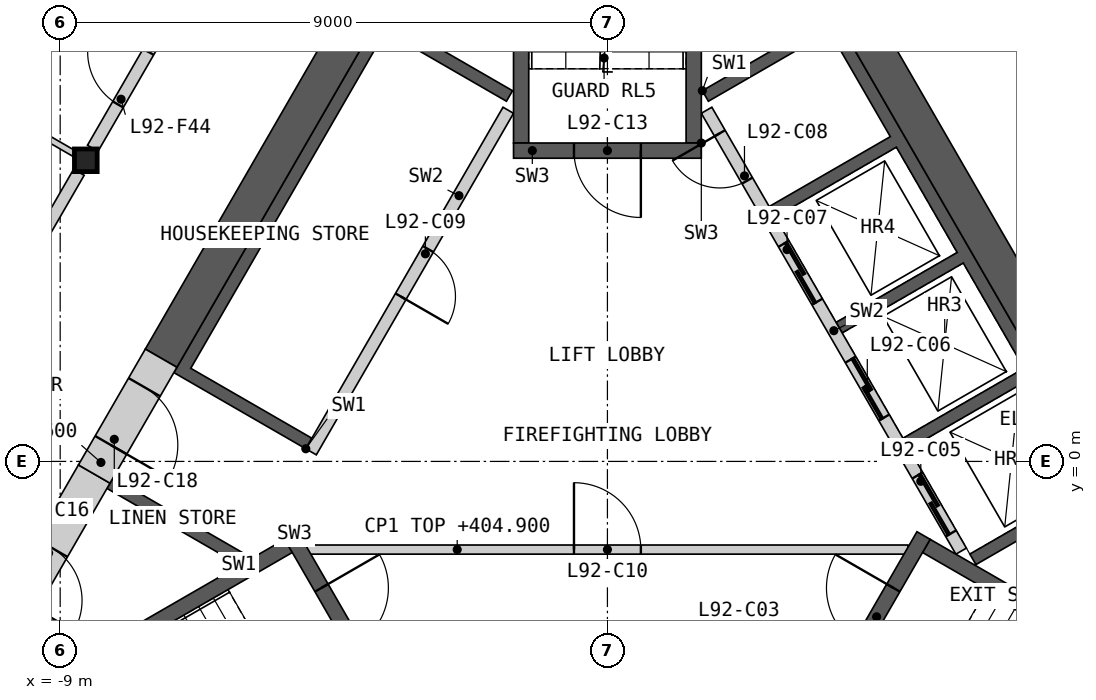
"""IFC4 building model, lengths in metres.
Left out: names, types, materials, properties, quantities, classifications, styles, units other than length and angle.
Written with IfcOpenShell. Run it as: python <this file> out.ifc"""

import sys

from ifc_helpers import new_model, si_unit, direction, frame, frame_2d, origin, origin_2d, place, context, subcontext, project, spatial, polyline, rectangle, i_section, outline, extrude, element, fill, save


model = new_model("IFC4")
c1 = context("Model", 3, precision=1e-05, world=origin(), true_north=direction((0.0, 1.0)))
c2 = subcontext(c1, "Body", "Model", "MODEL_VIEW")
j1 = project(units=[si_unit("LENGTHUNIT", "METRE"), si_unit("PLANEANGLEUNIT", "RADIAN")], contexts=[c1])
p1 = place(None, origin())
s1 = spatial("IfcSite", under=j1, at=p1, CompositionType="ELEMENT")
p2 = place(p1, origin())
s2 = spatial("IfcBuilding", under=s1, at=p2, CompositionType="ELEMENT")
p3 = place(p2, frame((0.0, 0.0, 401.8)))
s3 = spatial("IfcBuildingStorey", under=s2, at=p3, CompositionType="ELEMENT", Elevation=401.8)
p4 = place(p3, frame((-8.578, 4.953, 0.0), z_axis=(0.0, 0.0, 1.0), x_axis=(1.0, 0.0, 0.0)))
e1 = element("IfcColumn", 1, at=p4, inside=s3, PredefinedType="COLUMN", context=c2, shape_type="SweptSolid", body=[
    extrude(i_section(OverallWidth=0.374, OverallDepth=0.372, WebThickness=0.016, FlangeThickness=0.026, at=origin_2d()), origin(), (0.0, 0.0, 1.0), 3.4),
])
p5 = place(p3, origin())
e2 = element("IfcWall", 2, at=p5, inside=s3, PredefinedType="SHEAR", context=c2, shape_type="SweptSolid", body=[
    extrude(outline(polyline([(1.561, 6.097), (3.731, 7.35), (8.231, -0.444), (6.061, -1.697), (5.96, -1.524), (7.952, -0.374), (6.952, 1.358), (4.96, 0.208), (4.861, 0.381), (6.852, 1.531), (5.852, 3.263), (3.861, 2.113), (3.76, 2.287), (5.752, 3.437), (4.752, 5.169), (2.76, 4.019), (2.66, 4.192), (4.652, 5.342), (3.652, 7.074), (1.66, 5.924), (1.561, 6.097)])), origin(), (0.0, 0.0, 1.0), 3.1),
])
p6 = place(p3, frame((5.817, -1.476, 0.0), z_axis=(0.0, 0.0, 1.0), x_axis=(-0.500002616675, 0.866023893041, 0.0)))
e3 = element("IfcWall", 3, at=p6, inside=s3, PredefinedType="SOLIDWALL", context=c2, shape_type="SweptSolid", body=[
    extrude(rectangle(XDim=8.373, YDim=0.2, at=frame_2d((4.187, 0.0))), origin(), (0.0, 0.0, 1.0), 3.1),
])
p7 = place(p6, frame((0.337, 0.0, 0.0)))
e4 = element("IfcOpeningElement", 4, at=p7, cuts=e3, PredefinedType="OPENING", context=c2, shape_type="SweptSolid", body=[
    extrude(rectangle(XDim=1.1, YDim=2.1, at=frame_2d((0.55, 1.05))), frame((0.0, 0.11, 0.0), z_axis=(0.0, -1.0, 0.0), x_axis=(1.0, 0.0, 0.0)), (0.0, 0.0, 1.0), 0.22),
])
p8 = place(p6, frame((2.537, 0.0, 0.0)))
e5 = element("IfcOpeningElement", 5, at=p8, cuts=e3, PredefinedType="OPENING", context=c2, shape_type="SweptSolid", body=[
    extrude(rectangle(XDim=1.1, YDim=2.1, at=frame_2d((0.55, 1.05))), frame((0.0, 0.11, 0.0), z_axis=(0.0, -1.0, 0.0), x_axis=(1.0, 0.0, 0.0)), (0.0, 0.0, 1.0), 0.22),
])
p9 = place(p6, frame((4.737, 0.0, 0.0)))
e6 = element("IfcOpeningElement", 6, at=p9, cuts=e3, PredefinedType="OPENING", context=c2, shape_type="SweptSolid", body=[
    extrude(rectangle(XDim=1.1, YDim=2.1, at=frame_2d((0.55, 1.05))), frame((0.0, 0.11, 0.0), z_axis=(0.0, -1.0, 0.0), x_axis=(1.0, 0.0, 0.0)), (0.0, 0.0, 1.0), 0.22),
])
p10 = place(p6, frame((7.037, 0.0, 0.0)))
e7 = element("IfcOpeningElement", 7, at=p10, cuts=e3, PredefinedType="OPENING", context=c2, shape_type="SweptSolid", body=[
    extrude(rectangle(XDim=0.9, YDim=2.1, at=frame_2d((0.45, 1.05))), frame((0.0, 0.11, 0.0), z_axis=(0.0, -1.0, 0.0), x_axis=(1.0, 0.0, 0.0)), (0.0, 0.0, 1.0), 0.22),
])
p11 = place(p3, origin())
e8 = element("IfcWall", 8, at=p11, inside=s3, PredefinedType="SHEAR", context=c2, shape_type="SweptSolid", body=[
    extrude(outline(polyline([(-6.061, -1.697), (-8.231, -0.444), (-8.131, -0.271), (-5.96, -1.524), (-6.061, -1.697)])), origin(), (0.0, 0.0, 1.0), 3.1),
])
p12 = place(p3, origin())
e9 = element("IfcWall", 9, at=p12, inside=s3, PredefinedType="SHEAR", context=c2, shape_type="SweptSolid", body=[
    extrude(outline(polyline([(-4.96, 0.208), (-7.131, 1.461), (-3.731, 7.35), (-1.561, 6.097), (-1.66, 5.924), (-3.652, 7.074), (-6.852, 1.531), (-4.861, 0.381), (-4.96, 0.208)])), origin(), (0.0, 0.0, 1.0), 3.1),
])
p13 = place(p3, frame((-1.631, 5.776, 0.0), z_axis=(0.0, 0.0, 1.0), x_axis=(-0.499992876559, -0.866029516466, 0.0)))
e10 = element("IfcWall", 10, at=p13, inside=s3, PredefinedType="SOLIDWALL", context=c2, shape_type="SweptSolid", body=[
    extrude(rectangle(XDim=6.486, YDim=0.2, at=frame_2d((3.243, 0.0))), origin(), (0.0, 0.0, 1.0), 3.1),
])
p14 = place(p13, frame((2.637, 0.0, 0.0)))
e11 = element("IfcOpeningElement", 11, at=p14, cuts=e10, PredefinedType="OPENING", context=c2, shape_type="SweptSolid", body=[
    extrude(rectangle(XDim=0.9, YDim=2.1, at=frame_2d((0.45, 1.05))), frame((0.0, 0.11, 0.0), z_axis=(0.0, -1.0, 0.0), x_axis=(1.0, 0.0, 0.0)), (0.0, 0.0, 1.0), 0.22),
])
p15 = place(p3, frame((-4.941, -1.45, 0.0), z_axis=(0.0, 0.0, 1.0), x_axis=(1.0, 0.0, 0.0)))
e12 = element("IfcWall", 12, at=p15, inside=s3, PredefinedType="PARTITIONING", context=c2, shape_type="SweptSolid", body=[
    extrude(rectangle(XDim=9.882, YDim=0.15, at=frame_2d((4.941, 0.0))), origin(), (0.0, 0.0, 1.0), 3.1),
])
p16 = place(p15, frame((4.391, 0.0, 0.0)))
e13 = element("IfcOpeningElement", 13, at=p16, cuts=e12, PredefinedType="OPENING", context=c2, shape_type="SweptSolid", body=[
    extrude(rectangle(XDim=1.1, YDim=2.1, at=frame_2d((0.55, 1.05))), frame((0.0, 0.085, 0.0), z_axis=(0.0, -1.0, 0.0), x_axis=(1.0, 0.0, 0.0)), (0.0, 0.0, 1.0), 0.17),
])
p17 = place(p3, origin())
e14 = element("IfcWall", 14, at=p17, inside=s3, PredefinedType="SHEAR", context=c2, shape_type="SweptSolid", body=[
    extrude(outline(polyline([(-5.307, -1.281), (-10.374, -4.206), (-10.032, -4.298), (-5.182, -1.498), (-5.307, -1.281)])), origin(), (0.0, 0.0, 1.0), 3.1),
])
p18 = place(p3, frame((-5.199, -1.219, 0.0), z_axis=(0.0, 0.0, 1.0), x_axis=(0.499982516597, -0.866035497597, 0.0)))
e15 = element("IfcWall", 15, at=p18, inside=s3, PredefinedType="SHEAR", context=c2, shape_type="SweptSolid", body=[
    extrude(rectangle(XDim=3.088, YDim=0.25, at=frame_2d((1.544, 0.0))), origin(), (0.0, 0.0, 1.0), 3.1),
])
p19 = place(p18, frame((0.994, 0.0, 0.0)))
e16 = element("IfcOpeningElement", 16, at=p19, cuts=e15, PredefinedType="OPENING", context=c2, shape_type="SweptSolid", body=[
    extrude(rectangle(XDim=1.1, YDim=2.1, at=frame_2d((0.55, 1.05))), frame((0.0, 0.135, 0.0), z_axis=(0.0, -1.0, 0.0), x_axis=(1.0, 0.0, 0.0)), (0.0, 0.0, 1.0), 0.27),
])
p20 = place(p3, origin())
e17 = element("IfcWall", 17, at=p20, inside=s3, PredefinedType="SHEAR", context=c2, shape_type="SweptSolid", body=[
    extrude(outline(polyline([(10.032, -4.298), (10.374, -4.206), (5.307, -1.281), (5.182, -1.498), (10.032, -4.298)])), origin(), (0.0, 0.0, 1.0), 3.1),
])
p21 = place(p3, frame((3.655, -3.893, 0.0), z_axis=(0.0, 0.0, 1.0), x_axis=(0.499982516597, 0.866035497597, 0.0)))
e18 = element("IfcWall", 18, at=p21, inside=s3, PredefinedType="SHEAR", context=c2, shape_type="SweptSolid", body=[
    extrude(rectangle(XDim=3.088, YDim=0.25, at=frame_2d((1.544, 0.0))), origin(), (0.0, 0.0, 1.0), 3.1),
])
p22 = place(p21, frame((0.994, 0.0, 0.0)))
e19 = element("IfcOpeningElement", 19, at=p22, cuts=e18, PredefinedType="OPENING", context=c2, shape_type="SweptSolid", body=[
    extrude(rectangle(XDim=1.1, YDim=2.1, at=frame_2d((0.55, 1.05))), frame((0.0, 0.135, 0.0), z_axis=(0.0, -1.0, 0.0), x_axis=(1.0, 0.0, 0.0)), (0.0, 0.0, 1.0), 0.27),
])
p23 = place(p3, origin())
e20 = element("IfcWall", 20, at=p23, inside=s3, PredefinedType="SHEAR", context=c2, shape_type="SweptSolid", body=[
    extrude(outline(polyline([(1.544, 5.237), (1.544, 11.087), (1.294, 10.837), (1.294, 5.237), (1.544, 5.237)])), origin(), (0.0, 0.0, 1.0), 3.1),
])
p24 = place(p3, origin())
e21 = element("IfcWall", 21, at=p24, inside=s3, PredefinedType="SHEAR", context=c2, shape_type="SweptSolid", body=[
    extrude(outline(polyline([(-1.294, 10.837), (-1.544, 11.087), (-1.544, 5.237), (-1.294, 5.237), (-1.294, 10.837)])), origin(), (0.0, 0.0, 1.0), 3.1),
])
p25 = place(p3, frame((1.544, 5.112, 0.0), z_axis=(0.0, 0.0, 1.0), x_axis=(-1.0, 0.0, 0.0)))
e22 = element("IfcWall", 22, at=p25, inside=s3, PredefinedType="SHEAR", context=c2, shape_type="SweptSolid", body=[
    extrude(rectangle(XDim=3.088, YDim=0.25, at=frame_2d((1.544, 0.0))), origin(), (0.0, 0.0, 1.0), 3.1),
])
p26 = place(p25, frame((0.994, 0.0, 0.0)))
e23 = element("IfcOpeningElement", 23, at=p26, cuts=e22, PredefinedType="OPENING", context=c2, shape_type="SweptSolid", body=[
    extrude(rectangle(XDim=1.1, YDim=2.1, at=frame_2d((0.55, 1.05))), frame((0.0, 0.135, 0.0), z_axis=(0.0, -1.0, 0.0), x_axis=(1.0, 0.0, 0.0)), (0.0, 0.0, 1.0), 0.27),
])
p27 = place(p3, frame((8.686, -0.634, 0.0), z_axis=(0.0, 0.0, 1.0), x_axis=(-0.500004601921, 0.866022746848, 0.0)))
e24 = element("IfcWall", 24, at=p27, inside=s3, PredefinedType="SHEAR", context=c2, shape_type="SweptSolid", body=[
    extrude(rectangle(XDim=16.853, YDim=0.6, at=frame_2d((8.426, 0.0))), origin(), (0.0, 0.0, 1.0), 3.1),
])
p28 = place(p3, frame((-3.794, 7.84, 0.0), z_axis=(0.0, 0.0, 1.0), x_axis=(-0.499974747889, -0.866039982607, 0.0)))
e25 = element("IfcWall", 25, at=p28, inside=s3, PredefinedType="SHEAR", context=c2, shape_type="SweptSolid", body=[
    extrude(rectangle(XDim=7.092, YDim=0.6, at=frame_2d((3.546, 0.0))), origin(), (0.0, 0.0, 1.0), 3.1),
])
p29 = place(p3, frame((-8.44, -0.208, 0.0), z_axis=(0.0, 0.0, 1.0), x_axis=(-0.499997052475, -0.866027105532, 0.0)))
e26 = element("IfcWall", 26, at=p29, inside=s3, PredefinedType="SHEAR", context=c2, shape_type="SweptSolid", body=[
    extrude(rectangle(XDim=3.001, YDim=0.6, at=frame_2d((1.501, 0.0))), origin(), (0.0, 0.0, 1.0), 3.1),
])
p30 = place(p29, frame((1.4, 0.0, 0.0)))
e27 = element("IfcOpeningElement", 27, at=p30, cuts=e26, PredefinedType="OPENING", context=c2, shape_type="SweptSolid", body=[
    extrude(rectangle(XDim=1.0, YDim=2.1, at=frame_2d((0.5, 1.05))), frame((0.0, 0.31, 0.0), z_axis=(0.0, -1.0, 0.0), x_axis=(1.0, 0.0, 0.0)), (0.0, 0.0, 1.0), 0.62),
])
p31 = place(p3, frame((-7.34, 1.698, 0.0), z_axis=(0.0, 0.0, 1.0), x_axis=(-0.50002983664, -0.866008176907, 0.0)))
e28 = element("IfcWall", 28, at=p31, inside=s3, PredefinedType="SHEAR", context=c2, shape_type="SweptSolid", body=[
    extrude(rectangle(XDim=2.2, YDim=0.6, at=frame_2d((1.1, 0.0))), origin(), (0.0, 0.0, 1.0), 3.1),
])
p32 = place(p31, frame((0.55, 0.0, 0.0)))
e29 = element("IfcOpeningElement", 29, at=p32, cuts=e28, PredefinedType="OPENING", context=c2, shape_type="SweptSolid", body=[
    extrude(rectangle(XDim=1.1, YDim=2.1, at=frame_2d((0.55, 1.05))), frame((0.0, 0.31, 0.0), z_axis=(0.0, -1.0, 0.0), x_axis=(1.0, 0.0, 0.0)), (0.0, 0.0, 1.0), 0.62),
])
p33 = place(p3, frame((4.403, 12.185, 0.0), z_axis=(0.0, 0.0, 1.0), x_axis=(0.499992155518, -0.866029932751, 0.0)))
e30 = element("IfcWall", 30, at=p33, inside=s3, PredefinedType="PARTITIONING", context=c2, shape_type="SweptSolid", body=[
    extrude(rectangle(XDim=8.123, YDim=0.2, at=frame_2d((4.062, 0.0))), origin(), (0.0, 0.0, 1.0), 3.1),
])
p34 = place(p33, frame((3.963, 0.0, 0.0)))
e31 = element("IfcOpeningElement", 31, at=p34, cuts=e30, PredefinedType="OPENING", context=c2, shape_type="SweptSolid", body=[
    extrude(rectangle(XDim=1.0, YDim=2.1, at=frame_2d((0.5, 1.05))), frame((0.0, 0.11, 0.0), z_axis=(0.0, -1.0, 0.0), x_axis=(1.0, 0.0, 0.0)), (0.0, 0.0, 1.0), 0.22),
])
p35 = place(p33, frame((1.153, 0.0, 0.0)))
e32 = element("IfcOpeningElement", 32, at=p35, cuts=e30, PredefinedType="OPENING", context=c2, shape_type="SweptSolid", body=[
    extrude(rectangle(XDim=1.0, YDim=2.1, at=frame_2d((0.5, 1.05))), frame((0.0, 0.11, 0.0), z_axis=(0.0, -1.0, 0.0), x_axis=(1.0, 0.0, 0.0)), (0.0, 0.0, 1.0), 0.22),
])
p36 = place(p3, frame((-8.465, 5.15, 0.0), z_axis=(0.0, 0.0, 1.0), x_axis=(0.499992155518, 0.866029932751, 0.0)))
e33 = element("IfcWall", 33, at=p36, inside=s3, PredefinedType="PARTITIONING", context=c2, shape_type="SweptSolid", body=[
    extrude(rectangle(XDim=8.123, YDim=0.2, at=frame_2d((4.062, 0.0))), origin(), (0.0, 0.0, 1.0), 3.1),
])
p37 = place(p36, frame((5.97, 0.0, 0.0)))
e34 = element("IfcOpeningElement", 34, at=p37, cuts=e33, PredefinedType="OPENING", context=c2, shape_type="SweptSolid", body=[
    extrude(rectangle(XDim=1.0, YDim=2.1, at=frame_2d((0.5, 1.05))), frame((0.0, 0.11, 0.0), z_axis=(0.0, -1.0, 0.0), x_axis=(1.0, 0.0, 0.0)), (0.0, 0.0, 1.0), 0.22),
])
p38 = place(p36, frame((0.832, 0.0, 0.0)))
e35 = element("IfcOpeningElement", 35, at=p38, cuts=e33, PredefinedType="OPENING", context=c2, shape_type="SweptSolid", body=[
    extrude(rectangle(XDim=1.0, YDim=2.1, at=frame_2d((0.5, 1.05))), frame((0.0, 0.11, 0.0), z_axis=(0.0, -1.0, 0.0), x_axis=(1.0, 0.0, 0.0)), (0.0, 0.0, 1.0), 0.22),
])
p39 = place(p3, frame((-12.754, -2.279, 0.0), z_axis=(0.0, 0.0, 1.0), x_axis=(0.500001682468, 0.866024432409, 0.0)))
e36 = element("IfcWall", 36, at=p39, inside=s3, PredefinedType="PARTITIONING", context=c2, shape_type="SweptSolid", body=[
    extrude(rectangle(XDim=8.124, YDim=0.2, at=frame_2d((4.062, 0.0))), origin(), (0.0, 0.0, 1.0), 3.1),
])
p40 = place(p3, frame((-18.869, 10.894, 0.0), z_axis=(0.0, 0.0, 1.0), x_axis=(0.866023724155, -0.500002909193, 0.0)))
e37 = element("IfcWall", 37, at=p40, inside=s3, PredefinedType="PARTITIONING", context=c2, shape_type="SweptSolid", body=[
    extrude(rectangle(XDim=11.655, YDim=0.1, at=frame_2d((5.827, 0.0))), origin(), (0.0, 0.0, 1.0), 2.33),
])
p41 = place(p40, frame((6.453, 0.0, 0.0)))
e38 = element("IfcOpeningElement", 38, at=p41, cuts=e37, PredefinedType="OPENING", context=c2, shape_type="SweptSolid", body=[
    extrude(rectangle(XDim=0.95, YDim=2.1, at=frame_2d((0.475, 1.05))), frame((0.0, 0.06, 0.0), z_axis=(0.0, -1.0, 0.0), x_axis=(1.0, 0.0, 0.0)), (0.0, 0.0, 1.0), 0.12),
])
p42 = place(p7, origin())
e39 = element("IfcDoor", 39, at=p42, inside=s3, OperationType="SLIDING_TO_LEFT", PredefinedType="DOOR", context=c2, shape_type="SweptSolid", body=[
    extrude(rectangle(XDim=1.1, YDim=2.1, at=frame_2d((0.55, 1.05))), frame((0.0, 0.025, 0.0), z_axis=(0.0, -1.0, 0.0), x_axis=(1.0, 0.0, 0.0)), (0.0, 0.0, 1.0), 0.05),
])
fill(e4, e39)
p43 = place(p8, origin())
e40 = element("IfcDoor", 40, at=p43, inside=s3, OperationType="SLIDING_TO_LEFT", PredefinedType="DOOR", context=c2, shape_type="SweptSolid", body=[
    extrude(rectangle(XDim=1.1, YDim=2.1, at=frame_2d((0.55, 1.05))), frame((0.0, 0.025, 0.0), z_axis=(0.0, -1.0, 0.0), x_axis=(1.0, 0.0, 0.0)), (0.0, 0.0, 1.0), 0.05),
])
fill(e5, e40)
p44 = place(p9, origin())
e41 = element("IfcDoor", 41, at=p44, inside=s3, OperationType="SLIDING_TO_LEFT", PredefinedType="DOOR", context=c2, shape_type="SweptSolid", body=[
    extrude(rectangle(XDim=1.1, YDim=2.1, at=frame_2d((0.55, 1.05))), frame((0.0, 0.025, 0.0), z_axis=(0.0, -1.0, 0.0), x_axis=(1.0, 0.0, 0.0)), (0.0, 0.0, 1.0), 0.05),
])
fill(e6, e41)
p45 = place(p10, origin())
e42 = element("IfcDoor", 42, at=p45, inside=s3, OperationType="SINGLE_SWING_RIGHT", PredefinedType="DOOR", context=c2, shape_type="SweptSolid", body=[
    extrude(rectangle(XDim=0.9, YDim=2.1, at=frame_2d((0.45, 1.05))), frame((0.0, 0.025, 0.0), z_axis=(0.0, -1.0, 0.0), x_axis=(1.0, 0.0, 0.0)), (0.0, 0.0, 1.0), 0.05),
])
fill(e7, e42)
p46 = place(p14, origin())
e43 = element("IfcDoor", 43, at=p46, inside=s3, OperationType="SINGLE_SWING_RIGHT", PredefinedType="DOOR", context=c2, shape_type="SweptSolid", body=[
    extrude(rectangle(XDim=0.9, YDim=2.1, at=frame_2d((0.45, 1.05))), frame((0.0, 0.025, 0.0), z_axis=(0.0, -1.0, 0.0), x_axis=(1.0, 0.0, 0.0)), (0.0, 0.0, 1.0), 0.05),
])
fill(e11, e43)
p47 = place(p16, origin())
e44 = element("IfcDoor", 44, at=p47, inside=s3, OperationType="SINGLE_SWING_LEFT", PredefinedType="DOOR", context=c2, shape_type="SweptSolid", body=[
    extrude(rectangle(XDim=1.1, YDim=2.1, at=frame_2d((0.55, 1.05))), frame((0.0, 0.025, 0.0), z_axis=(0.0, -1.0, 0.0), x_axis=(1.0, 0.0, 0.0)), (0.0, 0.0, 1.0), 0.05),
])
fill(e13, e44)
p48 = place(p19, origin())
e45 = element("IfcDoor", 45, at=p48, inside=s3, OperationType="SINGLE_SWING_LEFT", PredefinedType="DOOR", context=c2, shape_type="SweptSolid", body=[
    extrude(rectangle(XDim=1.1, YDim=2.1, at=frame_2d((0.55, 1.05))), frame((0.0, 0.025, 0.0), z_axis=(0.0, -1.0, 0.0), x_axis=(1.0, 0.0, 0.0)), (0.0, 0.0, 1.0), 0.05),
])
fill(e16, e45)
p49 = place(p22, origin())
e46 = element("IfcDoor", 46, at=p49, inside=s3, OperationType="SINGLE_SWING_RIGHT", PredefinedType="DOOR", context=c2, shape_type="SweptSolid", body=[
    extrude(rectangle(XDim=1.1, YDim=2.1, at=frame_2d((0.55, 1.05))), frame((0.0, 0.025, 0.0), z_axis=(0.0, -1.0, 0.0), x_axis=(1.0, 0.0, 0.0)), (0.0, 0.0, 1.0), 0.05),
])
fill(e19, e46)
p50 = place(p26, origin())
e47 = element("IfcDoor", 47, at=p50, inside=s3, OperationType="SINGLE_SWING_LEFT", PredefinedType="DOOR", context=c2, shape_type="SweptSolid", body=[
    extrude(rectangle(XDim=1.1, YDim=2.1, at=frame_2d((0.55, 1.05))), frame((0.0, 0.025, 0.0), z_axis=(0.0, -1.0, 0.0), x_axis=(1.0, 0.0, 0.0)), (0.0, 0.0, 1.0), 0.05),
])
fill(e23, e47)
p51 = place(p30, origin())
e48 = element("IfcDoor", 48, at=p51, inside=s3, OperationType="SINGLE_SWING_RIGHT", PredefinedType="DOOR", context=c2, shape_type="SweptSolid", body=[
    extrude(rectangle(XDim=1.0, YDim=2.1, at=frame_2d((0.5, 1.05))), frame((0.0, 0.055, 0.0), z_axis=(0.0, -1.0, 0.0), x_axis=(1.0, 0.0, 0.0)), (0.0, 0.0, 1.0), 0.05),
])
fill(e27, e48)
p52 = place(p32, origin())
e49 = element("IfcDoor", 49, at=p52, inside=s3, OperationType="SINGLE_SWING_RIGHT", PredefinedType="DOOR", context=c2, shape_type="SweptSolid", body=[
    extrude(rectangle(XDim=1.1, YDim=2.1, at=frame_2d((0.55, 1.05))), frame((0.0, 0.055, 0.0), z_axis=(0.0, -1.0, 0.0), x_axis=(1.0, 0.0, 0.0)), (0.0, 0.0, 1.0), 0.05),
])
fill(e29, e49)
p53 = place(p38, origin())
e50 = element("IfcDoor", 50, at=p53, inside=s3, OperationType="SINGLE_SWING_RIGHT", PredefinedType="DOOR", context=c2, shape_type="SweptSolid", body=[
    extrude(rectangle(XDim=1.0, YDim=2.1, at=frame_2d((0.5, 1.05))), frame((0.0, 0.025, 0.0), z_axis=(0.0, -1.0, 0.0), x_axis=(1.0, 0.0, 0.0)), (0.0, 0.0, 1.0), 0.05),
])
fill(e35, e50)
save(model, sys.argv[1])
